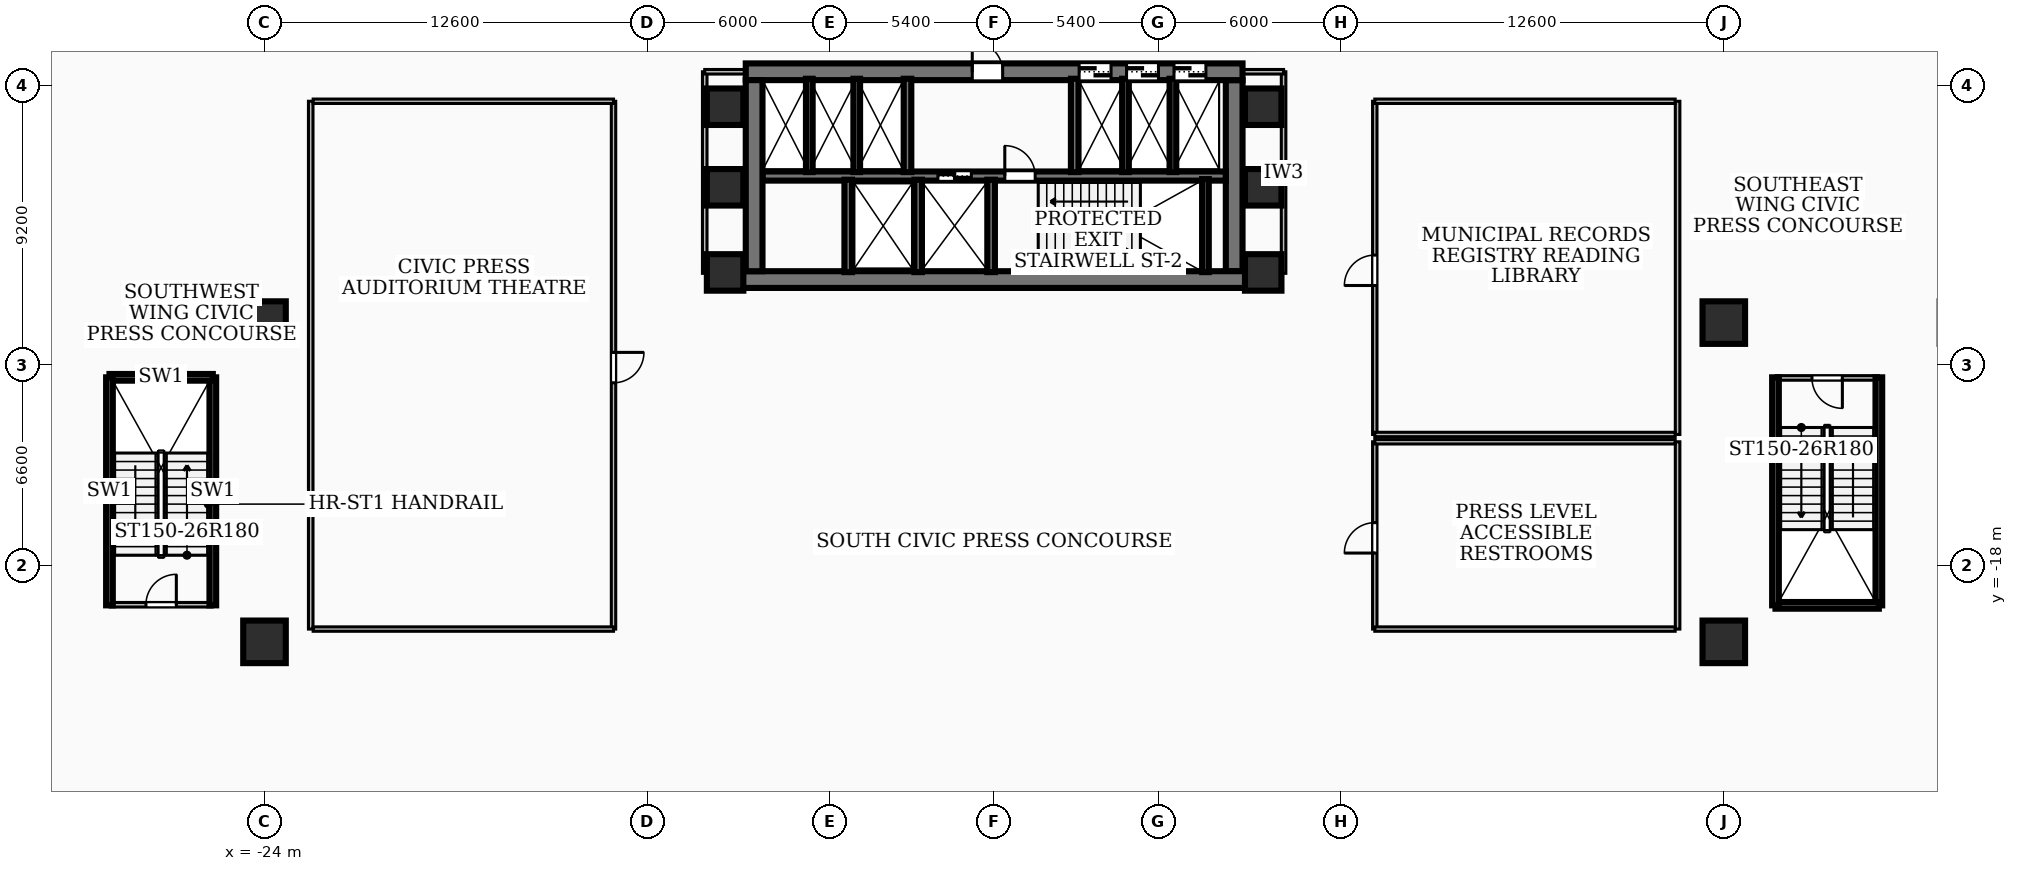
"""IFC4 building model, lengths in metres.
Left out: names, types, materials, properties, quantities, classifications, styles, units other than length and angle.
Written with IfcOpenShell. Run it as: python <this file> out.ifc"""

import sys

from ifc_helpers import new_model, si_unit, direction, frame, frame_2d, origin, origin_2d, place, context, subcontext, project, spatial, rectangle, extrude, element, fill, save


model = new_model("IFC4")
c1 = context("Model", 3, precision=1e-05, world=origin(), true_north=direction((0.0, 1.0)))
c2 = subcontext(c1, "Body", "Model", "MODEL_VIEW")
j1 = project(units=[si_unit("LENGTHUNIT", "METRE"), si_unit("PLANEANGLEUNIT", "RADIAN")], contexts=[c1])
p1 = place(None, origin())
s1 = spatial("IfcSite", under=j1, at=p1, CompositionType="ELEMENT")
p2 = place(p1, origin())
s2 = spatial("IfcBuilding", under=s1, at=p2, CompositionType="ELEMENT")
p3 = place(p2, frame((0.0, 0.0, 14.76)))
s3 = spatial("IfcBuildingStorey", under=s2, at=p3, CompositionType="ELEMENT", Elevation=14.76)
p4 = place(p3, frame((8.78, -8.585, 0.0), z_axis=(0.0, 0.0, 1.0), x_axis=(-1.0, 0.0, 0.0)))
e1 = element("IfcWall", 1, at=p4, inside=s3, PredefinedType="SHEAR", context=c2, shape_type="SweptSolid", body=[
    extrude(rectangle(XDim=17.56, YDim=0.55, at=frame_2d((8.78, 0.0))), origin(), (0.0, 0.0, 1.0), 4.28),
])
p5 = place(p3, frame((-8.17, -1.75, 0.0), z_axis=(0.0, 0.0, 1.0), x_axis=(1.0, 0.0, 0.0)))
e2 = element("IfcWall", 2, at=p5, inside=s3, PredefinedType="SHEAR", context=c2, shape_type="SweptSolid", body=[
    extrude(rectangle(XDim=16.34, YDim=0.55, at=frame_2d((8.17, 0.0))), origin(), (0.0, 0.0, 1.0), 4.28),
])
p6 = place(p5, frame((7.45, 0.0, 0.0)))
e3 = element("IfcOpeningElement", 3, at=p6, cuts=e2, PredefinedType="OPENING", context=c2, shape_type="SweptSolid", body=[
    extrude(rectangle(XDim=1.0, YDim=2.1, at=frame_2d((0.5, 1.05))), frame((0.0, 0.285, 0.0), z_axis=(0.0, -1.0, 0.0), x_axis=(1.0, 0.0, 0.0)), (0.0, 0.0, 1.0), 0.57),
])
p7 = place(p5, frame((10.965, 0.0, 0.0)))
e4 = element("IfcOpeningElement", 4, at=p7, cuts=e2, PredefinedType="OPENING", context=c2, shape_type="SweptSolid", body=[
    extrude(rectangle(XDim=1.05, YDim=2.15, at=frame_2d((0.525, 1.075))), frame((0.0, 0.285, 0.0), z_axis=(0.0, -1.0, 0.0), x_axis=(1.0, 0.0, 0.0)), (0.0, 0.0, 1.0), 0.57),
])
p8 = place(p5, frame((12.525, 0.0, 0.0)))
e5 = element("IfcOpeningElement", 5, at=p8, cuts=e2, PredefinedType="OPENING", context=c2, shape_type="SweptSolid", body=[
    extrude(rectangle(XDim=1.05, YDim=2.15, at=frame_2d((0.525, 1.075))), frame((0.0, 0.285, 0.0), z_axis=(0.0, -1.0, 0.0), x_axis=(1.0, 0.0, 0.0)), (0.0, 0.0, 1.0), 0.57),
])
p9 = place(p5, frame((14.085, 0.0, 0.0)))
e6 = element("IfcOpeningElement", 6, at=p9, cuts=e2, PredefinedType="OPENING", context=c2, shape_type="SweptSolid", body=[
    extrude(rectangle(XDim=1.05, YDim=2.15, at=frame_2d((0.525, 1.075))), frame((0.0, 0.285, 0.0), z_axis=(0.0, -1.0, 0.0), x_axis=(1.0, 0.0, 0.0)), (0.0, 0.0, 1.0), 0.57),
])
for number, where, z_axis, x_axis in (
    (7, (-7.895, -8.31, 0.0), (0.0, 0.0, 1.0), (0.0, 1.0, 0.0)),
    (8, (7.895, -2.025, 0.0), (0.0, 0.0, 1.0), (0.0, -1.0, 0.0)),
):
    element("IfcWall", number, at=place(p3, frame(where, z_axis=z_axis, x_axis=x_axis)), inside=s3, PredefinedType="SHEAR", context=c2, shape_type="SweptSolid", body=[
        extrude(rectangle(XDim=6.285, YDim=0.55, at=frame_2d((3.143, 0.0))), origin(), (0.0, 0.0, 1.0), 4.28),
    ])
p10 = place(p3, frame((-7.62, -5.18, 0.0), z_axis=(0.0, 0.0, 1.0), x_axis=(1.0, 0.0, 0.0)))
e9 = element("IfcWall", 9, at=p10, inside=s3, PredefinedType="SOLIDWALL", context=c2, shape_type="SweptSolid", body=[
    extrude(rectangle(XDim=15.24, YDim=0.3, at=frame_2d((7.62, 0.0))), origin(), (0.0, 0.0, 1.0), 4.28),
])
p11 = place(p10, frame((5.77, 0.0, 0.0)))
e10 = element("IfcOpeningElement", 10, at=p11, cuts=e9, PredefinedType="OPENING", context=c2, shape_type="SweptSolid", body=[
    extrude(rectangle(XDim=1.1, YDim=2.15, at=frame_2d((0.55, 1.075))), frame((0.0, 0.16, 0.0), z_axis=(0.0, -1.0, 0.0), x_axis=(1.0, 0.0, 0.0)), (0.0, 0.0, 1.0), 0.32),
])
p12 = place(p10, frame((7.97, 0.0, 0.0)))
e11 = element("IfcOpeningElement", 11, at=p12, cuts=e9, PredefinedType="OPENING", context=c2, shape_type="SweptSolid", body=[
    extrude(rectangle(XDim=1.0, YDim=2.1, at=frame_2d((0.5, 1.05))), frame((0.0, 0.16, 0.0), z_axis=(0.0, -1.0, 0.0), x_axis=(1.0, 0.0, 0.0)), (0.0, 0.0, 1.0), 0.32),
])
p13 = place(p3, frame((6.95, -8.34, 0.0), z_axis=(0.0, 0.0, 1.0), x_axis=(0.0, 1.0, 0.0)))
e12 = element("IfcWall", 12, at=p13, inside=s3, PredefinedType="SOLIDWALL", context=c2, shape_type="SweptSolid", body=[
    extrude(rectangle(XDim=3.06, YDim=0.22, at=frame_2d((1.53, 0.0))), origin(), (0.0, 0.0, 1.0), 4.28),
])
for number, where, z_axis, x_axis in (
    (13, (-0.1, -8.34, 0.0), (0.0, 0.0, 1.0), (0.0, 1.0, 0.0)),
    (14, (-2.5, -8.34, 0.0), (0.0, 0.0, 1.0), (0.0, 1.0, 0.0)),
    (15, (-4.8, -8.34, 0.0), (0.0, 0.0, 1.0), (0.0, 1.0, 0.0)),
):
    element("IfcWall", number, at=place(p3, frame(where, z_axis=z_axis, x_axis=x_axis)), inside=s3, PredefinedType="SOLIDWALL", context=c2, shape_type="SweptSolid", body=[
        extrude(rectangle(XDim=3.04, YDim=0.25, at=frame_2d((1.52, 0.0))), origin(), (0.0, 0.0, 1.0), 4.28),
    ])
for number, where, z_axis, x_axis in (
    (16, (-2.85, -5.05, 0.0), (0.0, 0.0, 1.0), (0.0, 1.0, 0.0)),
    (17, (2.65, -5.05, 0.0), (0.0, 0.0, 1.0), (0.0, 1.0, 0.0)),
):
    element("IfcWall", number, at=place(p3, frame(where, z_axis=z_axis, x_axis=x_axis)), inside=s3, PredefinedType="SOLIDWALL", context=c2, shape_type="SweptSolid", body=[
        extrude(rectangle(XDim=3.07, YDim=0.25, at=frame_2d((1.535, 0.0))), origin(), (0.0, 0.0, 1.0), 4.28),
    ])
for number, where, z_axis, x_axis in (
    (18, (4.32, -5.05, 0.0), (0.0, 0.0, 1.0), (0.0, 1.0, 0.0)),
    (19, (5.88, -5.05, 0.0), (0.0, 0.0, 1.0), (0.0, 1.0, 0.0)),
    (20, (-6.08, -5.05, 0.0), (0.0, 0.0, 1.0), (0.0, 1.0, 0.0)),
    (21, (-4.52, -5.05, 0.0), (0.0, 0.0, 1.0), (0.0, 1.0, 0.0)),
):
    element("IfcWall", number, at=place(p3, frame(where, z_axis=z_axis, x_axis=x_axis)), inside=s3, PredefinedType="SOLIDWALL", context=c2, shape_type="SweptSolid", body=[
        extrude(rectangle(XDim=3.07, YDim=0.22, at=frame_2d((1.535, 0.0))), origin(), (0.0, 0.0, 1.0), 4.28),
    ])
for number, where, z_axis, x_axis in (
    (22, (-29.1, -19.3, 0.0), (0.0, 0.0, 1.0), (0.0, 1.0, 0.0)),
    (23, (-25.7, -19.3, 0.0), (0.0, 0.0, 1.0), (0.0, 1.0, 0.0)),
):
    element("IfcWall", number, at=place(p3, frame(where, z_axis=z_axis, x_axis=x_axis)), inside=s3, PredefinedType="SOLIDWALL", context=c2, shape_type="SweptSolid", body=[
        extrude(rectangle(XDim=7.5, YDim=0.22, at=frame_2d((3.75, 0.0))), origin(), (0.0, 0.0, 1.0), 4.28),
    ])
p14 = place(p3, frame((-29.1, -11.8, 0.0), z_axis=(0.0, 0.0, 1.0), x_axis=(1.0, 0.0, 0.0)))
e24 = element("IfcWall", 24, at=p14, inside=s3, PredefinedType="SOLIDWALL", context=c2, shape_type="SweptSolid", body=[
    extrude(rectangle(XDim=3.4, YDim=0.22, at=frame_2d((1.7, 0.0))), origin(), (0.0, 0.0, 1.0), 4.28),
])
for number, where, z_axis, x_axis in (
    (25, (25.7, -19.3, 0.0), (0.0, 0.0, 1.0), (0.0, 1.0, 0.0)),
    (26, (29.1, -19.3, 0.0), (0.0, 0.0, 1.0), (0.0, 1.0, 0.0)),
):
    element("IfcWall", number, at=place(p3, frame(where, z_axis=z_axis, x_axis=x_axis)), inside=s3, PredefinedType="SOLIDWALL", context=c2, shape_type="SweptSolid", body=[
        extrude(rectangle(XDim=7.5, YDim=0.22, at=frame_2d((3.75, 0.0))), origin(), (0.0, 0.0, 1.0), 4.28),
    ])
p15 = place(p3, frame((25.7, -19.3, 0.0), z_axis=(0.0, 0.0, 1.0), x_axis=(1.0, 0.0, 0.0)))
e27 = element("IfcWall", 27, at=p15, inside=s3, PredefinedType="SOLIDWALL", context=c2, shape_type="SweptSolid", body=[
    extrude(rectangle(XDim=3.4, YDim=0.22, at=frame_2d((1.7, 0.0))), origin(), (0.0, 0.0, 1.0), 4.28),
])
for number, where, z_axis, x_axis in (
    (28, (-8.85, -5.55, 0.0), (0.0, 0.0, 1.0), (1.0, 0.0, 0.0)),
    (29, (-8.85, -2.9, 0.0), (0.0, 0.0, 1.0), (1.0, 0.0, 0.0)),
    (30, (8.85, -5.55, 0.0), (0.0, 0.0, 1.0), (1.0, 0.0, 0.0)),
    (31, (8.85, -2.9, 0.0), (0.0, 0.0, 1.0), (1.0, 0.0, 0.0)),
    (32, (8.85, -8.35, 0.0), (0.0, 0.0, 1.0), (1.0, 0.0, 0.0)),
    (33, (-8.85, -8.35, 0.0), (0.0, 0.0, 1.0), (1.0, 0.0, 0.0)),
):
    element("IfcColumn", number, at=place(p3, frame(where, z_axis=z_axis, x_axis=x_axis)), inside=s3, PredefinedType="COLUMN", context=c2, shape_type="SweptSolid", body=[
        extrude(rectangle(XDim=1.2, YDim=1.2, at=origin_2d()), origin(), (0.0, 0.0, 1.0), 4.68),
    ])
for number, where, z_axis, x_axis in (
    (34, (-24.0, -10.0, 0.0), (0.0, 0.0, 1.0), (1.0, 0.0, 0.0)),
    (35, (24.0, -10.0, 0.0), (0.0, 0.0, 1.0), (1.0, 0.0, 0.0)),
    (36, (-24.0, -20.5, 0.0), (0.0, 0.0, 1.0), (1.0, 0.0, 0.0)),
    (37, (24.0, -20.5, 0.0), (0.0, 0.0, 1.0), (1.0, 0.0, 0.0)),
):
    element("IfcColumn", number, at=place(p3, frame(where, z_axis=z_axis, x_axis=x_axis)), inside=s3, PredefinedType="COLUMN", context=c2, shape_type="SweptSolid", body=[
        extrude(rectangle(XDim=1.4, YDim=1.4, at=origin_2d()), origin(), (0.0, 0.0, 1.0), 4.68),
    ])
p16 = place(p3, frame((-29.08, -19.28, 0.0), z_axis=(0.0, 0.0, 1.0), x_axis=(1.0, 0.0, 0.0)))
e38 = element("IfcWall", 38, at=p16, inside=s3, PredefinedType="PARTITIONING", context=c2, shape_type="SweptSolid", body=[
    extrude(rectangle(XDim=3.36, YDim=0.15, at=frame_2d((1.68, 0.0))), origin(), (0.0, 0.0, 1.0), 4.28),
])
p17 = place(p16, frame((1.18, 0.0, 0.0)))
e39 = element("IfcOpeningElement", 39, at=p17, cuts=e38, PredefinedType="OPENING", context=c2, shape_type="SweptSolid", body=[
    extrude(rectangle(XDim=1.0, YDim=2.1, at=frame_2d((0.5, 1.05))), frame((0.0, 0.085, 0.0), z_axis=(0.0, -1.0, 0.0), x_axis=(1.0, 0.0, 0.0)), (0.0, 0.0, 1.0), 0.17),
])
p18 = place(p3, frame((29.08, -11.82, 0.0), z_axis=(0.0, 0.0, 1.0), x_axis=(-1.0, 0.0, 0.0)))
e40 = element("IfcWall", 40, at=p18, inside=s3, PredefinedType="PARTITIONING", context=c2, shape_type="SweptSolid", body=[
    extrude(rectangle(XDim=3.36, YDim=0.15, at=frame_2d((1.68, 0.0))), origin(), (0.0, 0.0, 1.0), 4.28),
])
p19 = place(p18, frame((1.18, 0.0, 0.0)))
e41 = element("IfcOpeningElement", 41, at=p19, cuts=e40, PredefinedType="OPENING", context=c2, shape_type="SweptSolid", body=[
    extrude(rectangle(XDim=1.0, YDim=2.1, at=frame_2d((0.5, 1.05))), frame((0.0, 0.085, 0.0), z_axis=(0.0, -1.0, 0.0), x_axis=(1.0, 0.0, 0.0)), (0.0, 0.0, 1.0), 0.17),
])
p20 = place(p3, frame((-9.52, -8.38, 0.0), z_axis=(0.0, 0.0, 1.0), x_axis=(0.0, 1.0, 0.0)))
e42 = element("IfcWall", 42, at=p20, inside=s3, PredefinedType="PARTITIONING", context=c2, shape_type="SweptSolid", body=[
    extrude(rectangle(XDim=6.63, YDim=0.15, at=frame_2d((3.315, 0.0))), origin(), (0.0, 0.0, 1.0), 3.29),
])
p21 = place(p3, frame((-7.85, -1.75, 0.0), z_axis=(0.0, 0.0, 1.0), x_axis=(-1.0, 0.0, 0.0)))
e43 = element("IfcWall", 43, at=p21, inside=s3, PredefinedType="PARTITIONING", context=c2, shape_type="SweptSolid", body=[
    extrude(rectangle(XDim=1.67, YDim=0.15, at=frame_2d((0.835, 0.0))), origin(), (0.0, 0.0, 1.0), 3.345),
])
p22 = place(p3, frame((9.52, -8.38, 0.0), z_axis=(0.0, 0.0, 1.0), x_axis=(0.0, 1.0, 0.0)))
e44 = element("IfcWall", 44, at=p22, inside=s3, PredefinedType="PARTITIONING", context=c2, shape_type="SweptSolid", body=[
    extrude(rectangle(XDim=6.63, YDim=0.15, at=frame_2d((3.315, 0.0))), origin(), (0.0, 0.0, 1.0), 3.29),
])
p23 = place(p3, frame((7.85, -1.75, 0.0), z_axis=(0.0, 0.0, 1.0), x_axis=(1.0, 0.0, 0.0)))
e45 = element("IfcWall", 45, at=p23, inside=s3, PredefinedType="PARTITIONING", context=c2, shape_type="SweptSolid", body=[
    extrude(rectangle(XDim=1.67, YDim=0.15, at=frame_2d((0.835, 0.0))), origin(), (0.0, 0.0, 1.0), 3.345),
])
p24 = place(p3, frame((-12.52, -2.72, 0.0), z_axis=(0.0, 0.0, 1.0), x_axis=(0.0, -1.0, 0.0)))
e46 = element("IfcWall", 46, at=p24, inside=s3, PredefinedType="PARTITIONING", context=c2, shape_type="SweptSolid", body=[
    extrude(rectangle(XDim=17.36, YDim=0.145, at=frame_2d((8.68, 0.0))), origin(), (0.0, 0.0, 1.0), 3.29),
])
p25 = place(p24, frame((8.26, 0.0, 0.0)))
e47 = element("IfcOpeningElement", 47, at=p25, cuts=e46, PredefinedType="OPENING", context=c2, shape_type="SweptSolid", body=[
    extrude(rectangle(XDim=1.0, YDim=2.1, at=frame_2d((0.5, 1.05))), frame((0.0, 0.083, 0.0), z_axis=(0.0, -1.0, 0.0), x_axis=(1.0, 0.0, 0.0)), (0.0, 0.0, 1.0), 0.165),
])
for number, where, z_axis, x_axis in (
    (48, (-22.4, -20.08, 0.0), (0.0, 0.0, 1.0), (1.0, 0.0, 0.0)),
    (49, (-22.4, -2.72, 0.0), (0.0, 0.0, 1.0), (1.0, 0.0, 0.0)),
):
    element("IfcWall", number, at=place(p3, frame(where, z_axis=z_axis, x_axis=x_axis)), inside=s3, PredefinedType="PARTITIONING", context=c2, shape_type="SweptSolid", body=[
        extrude(rectangle(XDim=9.88, YDim=0.145, at=frame_2d((4.94, 0.0))), origin(), (0.0, 0.0, 1.0), 4.28),
    ])
p26 = place(p3, frame((-22.48, -20.08, 0.0), z_axis=(0.0, 0.0, 1.0), x_axis=(0.0, 1.0, 0.0)))
e50 = element("IfcWall", 50, at=p26, inside=s3, PredefinedType="PARTITIONING", context=c2, shape_type="SweptSolid", body=[
    extrude(rectangle(XDim=17.36, YDim=0.15, at=frame_2d((8.68, 0.0))), origin(), (0.0, 0.0, 1.0), 3.29),
])
p27 = place(p3, frame((12.52, -13.68, 0.0), z_axis=(0.0, 0.0, 1.0), x_axis=(0.0, 1.0, 0.0)))
e51 = element("IfcWall", 51, at=p27, inside=s3, PredefinedType="PARTITIONING", context=c2, shape_type="SweptSolid", body=[
    extrude(rectangle(XDim=10.96, YDim=0.145, at=frame_2d((5.48, 0.0))), origin(), (0.0, 0.0, 1.0), 3.29),
])
p28 = place(p27, frame((4.9, 0.0, 0.0)))
e52 = element("IfcOpeningElement", 52, at=p28, cuts=e51, PredefinedType="OPENING", context=c2, shape_type="SweptSolid", body=[
    extrude(rectangle(XDim=1.0, YDim=2.1, at=frame_2d((0.5, 1.05))), frame((0.0, 0.083, 0.0), z_axis=(0.0, -1.0, 0.0), x_axis=(1.0, 0.0, 0.0)), (0.0, 0.0, 1.0), 0.165),
])
for number, where, z_axis, x_axis in (
    (53, (12.52, -13.68, 0.0), (0.0, 0.0, 1.0), (1.0, 0.0, 0.0)),
    (54, (12.52, -2.72, 0.0), (0.0, 0.0, 1.0), (1.0, 0.0, 0.0)),
):
    element("IfcWall", number, at=place(p3, frame(where, z_axis=z_axis, x_axis=x_axis)), inside=s3, PredefinedType="PARTITIONING", context=c2, shape_type="SweptSolid", body=[
        extrude(rectangle(XDim=9.88, YDim=0.145, at=frame_2d((4.94, 0.0))), origin(), (0.0, 0.0, 1.0), 4.28),
    ])
p29 = place(p3, frame((22.48, -13.68, 0.0), z_axis=(0.0, 0.0, 1.0), x_axis=(0.0, 1.0, 0.0)))
e55 = element("IfcWall", 55, at=p29, inside=s3, PredefinedType="PARTITIONING", context=c2, shape_type="SweptSolid", body=[
    extrude(rectangle(XDim=10.96, YDim=0.15, at=frame_2d((5.48, 0.0))), origin(), (0.0, 0.0, 1.0), 3.29),
])
p30 = place(p3, frame((12.52, -20.08, 0.0), z_axis=(0.0, 0.0, 1.0), x_axis=(0.0, 1.0, 0.0)))
e56 = element("IfcWall", 56, at=p30, inside=s3, PredefinedType="PARTITIONING", context=c2, shape_type="SweptSolid", body=[
    extrude(rectangle(XDim=6.16, YDim=0.145, at=frame_2d((3.08, 0.0))), origin(), (0.0, 0.0, 1.0), 4.28),
])
p31 = place(p30, frame((2.5, 0.0, 0.0)))
e57 = element("IfcOpeningElement", 57, at=p31, cuts=e56, PredefinedType="OPENING", context=c2, shape_type="SweptSolid", body=[
    extrude(rectangle(XDim=1.0, YDim=2.1, at=frame_2d((0.5, 1.05))), frame((0.0, 0.083, 0.0), z_axis=(0.0, -1.0, 0.0), x_axis=(1.0, 0.0, 0.0)), (0.0, 0.0, 1.0), 0.165),
])
for number, where, z_axis, x_axis in (
    (58, (12.52, -20.08, 0.0), (0.0, 0.0, 1.0), (1.0, 0.0, 0.0)),
    (59, (12.52, -13.92, 0.0), (0.0, 0.0, 1.0), (1.0, 0.0, 0.0)),
):
    element("IfcWall", number, at=place(p3, frame(where, z_axis=z_axis, x_axis=x_axis)), inside=s3, PredefinedType="PARTITIONING", context=c2, shape_type="SweptSolid", body=[
        extrude(rectangle(XDim=9.88, YDim=0.145, at=frame_2d((4.94, 0.0))), origin(), (0.0, 0.0, 1.0), 4.28),
    ])
p32 = place(p3, frame((22.48, -20.08, 0.0), z_axis=(0.0, 0.0, 1.0), x_axis=(0.0, 1.0, 0.0)))
e60 = element("IfcWall", 60, at=p32, inside=s3, PredefinedType="PARTITIONING", context=c2, shape_type="SweptSolid", body=[
    extrude(rectangle(XDim=6.16, YDim=0.15, at=frame_2d((3.08, 0.0))), origin(), (0.0, 0.0, 1.0), 4.28),
])
p33 = place(p17, origin())
e61 = element("IfcDoor", 61, at=p33, inside=s3, OperationType="SINGLE_SWING_RIGHT", PredefinedType="DOOR", context=c2, shape_type="SweptSolid", body=[
    extrude(rectangle(XDim=1.0, YDim=2.1, at=frame_2d((0.5, 1.05))), frame((0.0, 0.025, 0.0), z_axis=(0.0, -1.0, 0.0), x_axis=(1.0, 0.0, 0.0)), (0.0, 0.0, 1.0), 0.05),
])
fill(e39, e61)
p34 = place(p19, origin())
e62 = element("IfcDoor", 62, at=p34, inside=s3, OperationType="SINGLE_SWING_LEFT", PredefinedType="DOOR", context=c2, shape_type="SweptSolid", body=[
    extrude(rectangle(XDim=1.0, YDim=2.1, at=frame_2d((0.5, 1.05))), frame((0.0, 0.025, 0.0), z_axis=(0.0, -1.0, 0.0), x_axis=(1.0, 0.0, 0.0)), (0.0, 0.0, 1.0), 0.05),
])
fill(e41, e62)
p35 = place(p6, origin())
e63 = element("IfcDoor", 63, at=p35, inside=s3, OperationType="SINGLE_SWING_LEFT", PredefinedType="DOOR", context=c2, shape_type="SweptSolid", body=[
    extrude(rectangle(XDim=1.0, YDim=2.1, at=frame_2d((0.5, 1.05))), frame((0.0, 0.025, 0.0), z_axis=(0.0, -1.0, 0.0), x_axis=(1.0, 0.0, 0.0)), (0.0, 0.0, 1.0), 0.05),
])
fill(e3, e63)
p36 = place(p11, origin())
e64 = element("IfcDoor", 64, at=p36, inside=s3, OperationType="DOUBLE_DOOR_SLIDING", PredefinedType="DOOR", context=c2, shape_type="SweptSolid", body=[
    extrude(rectangle(XDim=1.1, YDim=2.15, at=frame_2d((0.55, 1.075))), frame((0.0, 0.025, 0.0), z_axis=(0.0, -1.0, 0.0), x_axis=(1.0, 0.0, 0.0)), (0.0, 0.0, 1.0), 0.05),
])
fill(e10, e64)
p37 = place(p12, origin())
e65 = element("IfcDoor", 65, at=p37, inside=s3, OperationType="SINGLE_SWING_LEFT", PredefinedType="DOOR", context=c2, shape_type="SweptSolid", body=[
    extrude(rectangle(XDim=1.0, YDim=2.1, at=frame_2d((0.5, 1.05))), frame((0.0, 0.025, 0.0), z_axis=(0.0, -1.0, 0.0), x_axis=(1.0, 0.0, 0.0)), (0.0, 0.0, 1.0), 0.05),
])
fill(e11, e65)
p38 = place(p7, origin())
e66 = element("IfcDoor", 66, at=p38, inside=s3, OperationType="DOUBLE_DOOR_SLIDING", PredefinedType="DOOR", context=c2, shape_type="SweptSolid", body=[
    extrude(rectangle(XDim=1.05, YDim=2.15, at=frame_2d((0.525, 1.075))), frame((0.0, 0.025, 0.0), z_axis=(0.0, -1.0, 0.0), x_axis=(1.0, 0.0, 0.0)), (0.0, 0.0, 1.0), 0.05),
])
fill(e4, e66)
p39 = place(p8, origin())
e67 = element("IfcDoor", 67, at=p39, inside=s3, OperationType="DOUBLE_DOOR_SLIDING", PredefinedType="DOOR", context=c2, shape_type="SweptSolid", body=[
    extrude(rectangle(XDim=1.05, YDim=2.15, at=frame_2d((0.525, 1.075))), frame((0.0, 0.025, 0.0), z_axis=(0.0, -1.0, 0.0), x_axis=(1.0, 0.0, 0.0)), (0.0, 0.0, 1.0), 0.05),
])
fill(e5, e67)
p40 = place(p9, origin())
e68 = element("IfcDoor", 68, at=p40, inside=s3, OperationType="DOUBLE_DOOR_SLIDING", PredefinedType="DOOR", context=c2, shape_type="SweptSolid", body=[
    extrude(rectangle(XDim=1.05, YDim=2.15, at=frame_2d((0.525, 1.075))), frame((0.0, 0.025, 0.0), z_axis=(0.0, -1.0, 0.0), x_axis=(1.0, 0.0, 0.0)), (0.0, 0.0, 1.0), 0.05),
])
fill(e6, e68)
p41 = place(p25, origin())
e69 = element("IfcDoor", 69, at=p41, inside=s3, OperationType="SINGLE_SWING_LEFT", PredefinedType="DOOR", context=c2, shape_type="SweptSolid", body=[
    extrude(rectangle(XDim=1.0, YDim=2.1, at=frame_2d((0.5, 1.05))), frame((0.0, 0.025, 0.0), z_axis=(0.0, -1.0, 0.0), x_axis=(1.0, 0.0, 0.0)), (0.0, 0.0, 1.0), 0.05),
])
fill(e47, e69)
p42 = place(p28, origin())
e70 = element("IfcDoor", 70, at=p42, inside=s3, OperationType="SINGLE_SWING_LEFT", PredefinedType="DOOR", context=c2, shape_type="SweptSolid", body=[
    extrude(rectangle(XDim=1.0, YDim=2.1, at=frame_2d((0.5, 1.05))), frame((0.0, 0.025, 0.0), z_axis=(0.0, -1.0, 0.0), x_axis=(1.0, 0.0, 0.0)), (0.0, 0.0, 1.0), 0.05),
])
fill(e52, e70)
p43 = place(p31, origin())
e71 = element("IfcDoor", 71, at=p43, inside=s3, OperationType="SINGLE_SWING_LEFT", PredefinedType="DOOR", context=c2, shape_type="SweptSolid", body=[
    extrude(rectangle(XDim=1.0, YDim=2.1, at=frame_2d((0.5, 1.05))), frame((0.0, 0.025, 0.0), z_axis=(0.0, -1.0, 0.0), x_axis=(1.0, 0.0, 0.0)), (0.0, 0.0, 1.0), 0.05),
])
fill(e57, e71)
save(model, sys.argv[1])
